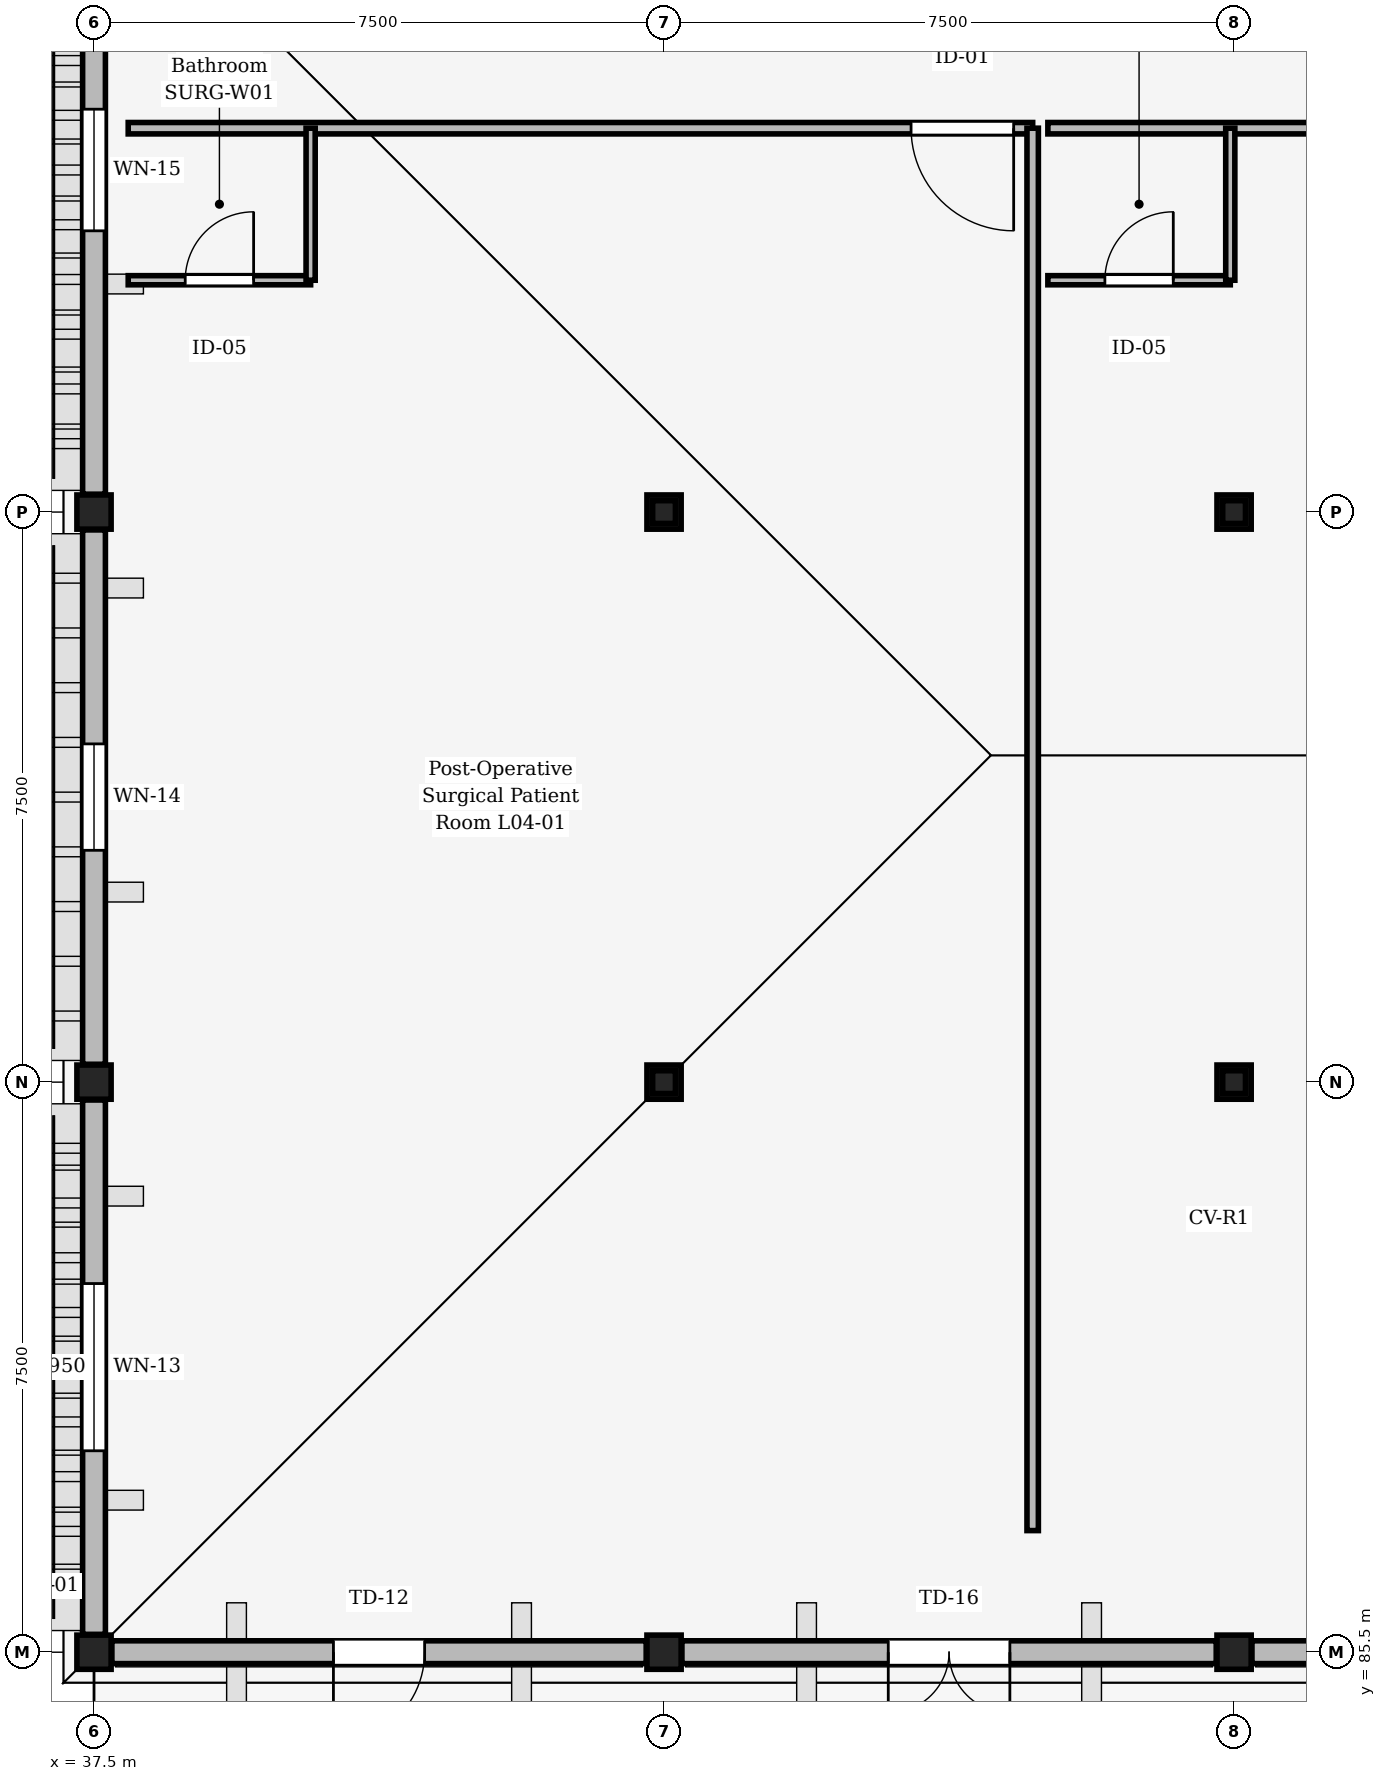
"""IFC4 building model, lengths in metres.
Left out: names, types, materials, properties, quantities, classifications, styles, units other than length and angle.
Written with IfcOpenShell. Run it as: python <this file> out.ifc"""

import sys

from ifc_helpers import new_model, si_unit, direction, frame, frame_2d, origin, origin_2d, place, context, subcontext, project, spatial, rectangle, i_section, extrude, element, fill, save


model = new_model("IFC4")
c1 = context("Model", 3, precision=1e-05, world=origin(), true_north=direction((0.0, 1.0)))
c2 = subcontext(c1, "Body", "Model", "MODEL_VIEW")
j1 = project(units=[si_unit("LENGTHUNIT", "METRE"), si_unit("PLANEANGLEUNIT", "RADIAN")], contexts=[c1])
p1 = place(None, origin())
s1 = spatial("IfcSite", under=j1, at=p1, CompositionType="ELEMENT")
p2 = place(p1, origin())
s2 = spatial("IfcBuilding", under=s1, at=p2, CompositionType="ELEMENT")
p3 = place(p2, frame((0.0, 0.0, 17.85)))
s3 = spatial("IfcBuildingStorey", under=s2, at=p3, CompositionType="ELEMENT", Elevation=17.85)
for number, where, z_axis, x_axis in (
    (1, (37.5, 85.5, 0.0), (0.0, 0.0, 1.0), (1.0, 0.0, 0.0)),
    (2, (37.5, 93.0, 0.0), (0.0, 0.0, 1.0), (1.0, 0.0, 0.0)),
    (3, (37.5, 100.5, 0.0), (0.0, 0.0, 1.0), (1.0, 0.0, 0.0)),
    (4, (45.0, 85.5, 0.0), (0.0, 0.0, 1.0), (1.0, 0.0, 0.0)),
    (5, (45.0, 93.0, 0.0), (0.0, 0.0, 1.0), (1.0, 0.0, 0.0)),
    (6, (45.0, 100.5, 0.0), (0.0, 0.0, 1.0), (1.0, 0.0, 0.0)),
    (7, (52.5, 85.5, 0.0), (0.0, 0.0, 1.0), (1.0, 0.0, 0.0)),
    (8, (52.5, 93.0, 0.0), (0.0, 0.0, 1.0), (1.0, 0.0, 0.0)),
    (9, (52.5, 100.5, 0.0), (0.0, 0.0, 1.0), (1.0, 0.0, 0.0)),
):
    element("IfcColumn", number, at=place(p3, frame(where, z_axis=z_axis, x_axis=x_axis)), inside=s3, PredefinedType="COLUMN", context=c2, shape_type="SweptSolid", body=[
        extrude(rectangle(XDim=0.45, YDim=0.45, at=origin_2d()), origin(), (0.0, 0.0, 1.0), 4.05),
    ])
for number, where, z_axis, x_axis in (
    (10, (45.0, 93.0, 4.05), (0.0, 0.0, 1.0), (1.0, 0.0, 0.0)),
    (11, (45.0, 100.5, 4.05), (0.0, 0.0, 1.0), (1.0, 0.0, 0.0)),
    (12, (52.5, 93.0, 4.05), (0.0, 0.0, 1.0), (1.0, 0.0, 0.0)),
):
    element("IfcColumn", number, at=place(p3, frame(where, z_axis=z_axis, x_axis=x_axis)), inside=s3, PredefinedType="COLUMN", context=c2, shape_type="SweptSolid", body=[
        extrude(i_section(OverallWidth=0.3, OverallDepth=0.3, WebThickness=0.011, FlangeThickness=0.019, FilletRadius=0.027, at=origin_2d()), origin(), (0.0, 0.0, 1.0), 1.97),
    ])
p4 = place(p3, frame((52.5, 100.5, 4.05), z_axis=(0.0, 0.0, 1.0), x_axis=(1.0, 0.0, 0.0)))
e13 = element("IfcColumn", 13, at=p4, inside=s3, PredefinedType="COLUMN", context=c2, shape_type="SweptSolid", body=[
    extrude(i_section(OverallWidth=0.3, OverallDepth=0.3, WebThickness=0.011, FlangeThickness=0.019, FilletRadius=0.027, at=origin_2d()), origin(), (0.0, 0.0, 1.0), 2.24),
])
p5 = place(p3, frame((44.765, 85.5, 0.0), z_axis=(0.0, 0.0, 1.0), x_axis=(-1.0, 0.0, 0.0)))
e14 = element("IfcWall", 14, at=p5, inside=s3, PredefinedType="STANDARD", context=c2, shape_type="SweptSolid", body=[
    extrude(rectangle(XDim=7.03, YDim=0.3, at=frame_2d((3.515, 0.0))), origin(), (0.0, 0.0, 1.0), 3.77),
])
p6 = place(p5, frame((2.915, 0.0, 0.0)))
e15 = element("IfcOpeningElement", 15, at=p6, cuts=e14, PredefinedType="OPENING", context=c2, shape_type="SweptSolid", body=[
    extrude(rectangle(XDim=1.2, YDim=2.3, at=frame_2d((0.6, 1.15))), frame((0.0, 0.16, 0.0), z_axis=(0.0, -1.0, 0.0), x_axis=(1.0, 0.0, 0.0)), (0.0, 0.0, 1.0), 0.32),
])
p7 = place(p3, frame((37.5, 85.735, 0.0), z_axis=(0.0, 0.0, 1.0), x_axis=(0.0, 1.0, 0.0)))
e16 = element("IfcWall", 16, at=p7, inside=s3, PredefinedType="STANDARD", context=c2, shape_type="SweptSolid", body=[
    extrude(rectangle(XDim=7.03, YDim=0.3, at=frame_2d((3.515, 0.0))), origin(), (0.0, 0.0, 1.0), 3.77),
])
p8 = place(p7, frame((2.415, 0.0, 0.9)))
e17 = element("IfcOpeningElement", 17, at=p8, cuts=e16, PredefinedType="OPENING", context=c2, shape_type="SweptSolid", body=[
    extrude(rectangle(XDim=2.2, YDim=1.95, at=frame_2d((1.1, 0.975))), frame((0.0, 0.16, 0.0), z_axis=(0.0, -1.0, 0.0), x_axis=(1.0, 0.0, 0.0)), (0.0, 0.0, 1.0), 0.32),
])
p9 = place(p3, frame((37.5, 93.235, 0.0), z_axis=(0.0, 0.0, 1.0), x_axis=(0.0, 1.0, 0.0)))
e18 = element("IfcWall", 18, at=p9, inside=s3, PredefinedType="STANDARD", context=c2, shape_type="SweptSolid", body=[
    extrude(rectangle(XDim=7.03, YDim=0.3, at=frame_2d((3.515, 0.0))), origin(), (0.0, 0.0, 1.0), 3.77),
])
p10 = place(p9, frame((2.815, 0.0, 0.9)))
e19 = element("IfcOpeningElement", 19, at=p10, cuts=e18, PredefinedType="OPENING", context=c2, shape_type="SweptSolid", body=[
    extrude(rectangle(XDim=1.4, YDim=1.8, at=frame_2d((0.7, 0.9))), frame((0.0, 0.16, 0.0), z_axis=(0.0, -1.0, 0.0), x_axis=(1.0, 0.0, 0.0)), (0.0, 0.0, 1.0), 0.32),
])
p11 = place(p3, frame((37.5, 100.735, 0.0), z_axis=(0.0, 0.0, 1.0), x_axis=(0.0, 1.0, 0.0)))
e20 = element("IfcWall", 20, at=p11, inside=s3, PredefinedType="STANDARD", context=c2, shape_type="SweptSolid", body=[
    extrude(rectangle(XDim=8.53, YDim=0.3, at=frame_2d((4.265, 0.0))), origin(), (0.0, 0.0, 1.0), 3.77),
])
p12 = place(p11, frame((3.465, 0.0, 0.9)))
e21 = element("IfcOpeningElement", 21, at=p12, cuts=e20, PredefinedType="OPENING", context=c2, shape_type="SweptSolid", body=[
    extrude(rectangle(XDim=1.6, YDim=1.8, at=frame_2d((0.8, 0.9))), frame((0.0, 0.16, 0.0), z_axis=(0.0, -1.0, 0.0), x_axis=(1.0, 0.0, 0.0)), (0.0, 0.0, 1.0), 0.32),
])
p13 = place(p3, frame((52.265, 85.5, 0.0), z_axis=(0.0, 0.0, 1.0), x_axis=(-1.0, 0.0, 0.0)))
e22 = element("IfcWall", 22, at=p13, inside=s3, PredefinedType="STANDARD", context=c2, shape_type="SweptSolid", body=[
    extrude(rectangle(XDim=7.03, YDim=0.3, at=frame_2d((3.515, 0.0))), origin(), (0.0, 0.0, 1.0), 3.77),
])
p14 = place(p13, frame((2.715, 0.0, 0.0)))
e23 = element("IfcOpeningElement", 23, at=p14, cuts=e22, PredefinedType="OPENING", context=c2, shape_type="SweptSolid", body=[
    extrude(rectangle(XDim=1.6, YDim=2.35, at=frame_2d((0.8, 1.175))), frame((0.0, 0.16, 0.0), z_axis=(0.0, -1.0, 0.0), x_axis=(1.0, 0.0, 0.0)), (0.0, 0.0, 1.0), 0.32),
])
p15 = place(p3, frame((59.765, 85.5, 0.0), z_axis=(0.0, 0.0, 1.0), x_axis=(-1.0, 0.0, 0.0)))
e24 = element("IfcWall", 24, at=p15, inside=s3, PredefinedType="STANDARD", context=c2, shape_type="SweptSolid", body=[
    extrude(rectangle(XDim=7.03, YDim=0.3, at=frame_2d((3.515, 0.0))), origin(), (0.0, 0.0, 1.0), 3.77),
])
p16 = place(p15, frame((2.915, 0.0, 0.0)))
e25 = element("IfcOpeningElement", 25, at=p16, cuts=e24, PredefinedType="OPENING", context=c2, shape_type="SweptSolid", body=[
    extrude(rectangle(XDim=1.2, YDim=2.3, at=frame_2d((0.6, 1.15))), frame((0.0, 0.16, 0.0), z_axis=(0.0, -1.0, 0.0), x_axis=(1.0, 0.0, 0.0)), (0.0, 0.0, 1.0), 0.32),
])
p17 = place(p3, frame((49.85, 105.55, 0.0), z_axis=(0.0, 0.0, 1.0), x_axis=(-1.0, 0.0, 0.0)))
e26 = element("IfcWall", 26, at=p17, inside=s3, PredefinedType="PARTITIONING", context=c2, shape_type="SweptSolid", body=[
    extrude(rectangle(XDim=11.9, YDim=0.15, at=frame_2d((5.95, 0.0))), origin(), (0.0, 0.0, 1.0), 3.755),
])
p18 = place(p17, frame((0.25, 0.0, 0.0)))
e27 = element("IfcOpeningElement", 27, at=p18, cuts=e26, PredefinedType="OPENING", context=c2, shape_type="SweptSolid", body=[
    extrude(rectangle(XDim=1.35, YDim=2.25, at=frame_2d((0.675, 1.125))), frame((0.0, 0.085, 0.0), z_axis=(0.0, -1.0, 0.0), x_axis=(1.0, 0.0, 0.0)), (0.0, 0.0, 1.0), 0.17),
])
p19 = place(p3, frame((37.95, 103.55, 0.0), z_axis=(0.0, 0.0, 1.0), x_axis=(1.0, 0.0, 0.0)))
e28 = element("IfcWall", 28, at=p19, inside=s3, PredefinedType="PARTITIONING", context=c2, shape_type="SweptSolid", body=[
    extrude(rectangle(XDim=2.4, YDim=0.12, at=frame_2d((1.2, 0.0))), origin(), (0.0, 0.0, 1.0), 3.755),
])
p20 = place(p19, frame((0.75, 0.0, 0.0)))
e29 = element("IfcOpeningElement", 29, at=p20, cuts=e28, PredefinedType="OPENING", context=c2, shape_type="SweptSolid", body=[
    extrude(rectangle(XDim=0.9, YDim=2.1, at=frame_2d((0.45, 1.05))), frame((0.0, 0.07, 0.0), z_axis=(0.0, -1.0, 0.0), x_axis=(1.0, 0.0, 0.0)), (0.0, 0.0, 1.0), 0.14),
])
p21 = place(p3, frame((40.35, 103.55, 0.0), z_axis=(0.0, 0.0, 1.0), x_axis=(0.0, 1.0, 0.0)))
e30 = element("IfcWall", 30, at=p21, inside=s3, PredefinedType="PARTITIONING", context=c2, shape_type="SweptSolid", body=[
    extrude(rectangle(XDim=2.0, YDim=0.12, at=frame_2d((1.0, 0.0))), origin(), (0.0, 0.0, 1.0), 3.755),
])
p22 = place(p3, frame((61.95, 105.55, 0.0), z_axis=(0.0, 0.0, 1.0), x_axis=(-1.0, 0.0, 0.0)))
e31 = element("IfcWall", 31, at=p22, inside=s3, PredefinedType="PARTITIONING", context=c2, shape_type="SweptSolid", body=[
    extrude(rectangle(XDim=11.9, YDim=0.15, at=frame_2d((5.95, 0.0))), origin(), (0.0, 0.0, 1.0), 3.755),
])
p23 = place(p22, frame((5.275, 0.0, 0.0)))
e32 = element("IfcOpeningElement", 32, at=p23, cuts=e31, PredefinedType="OPENING", context=c2, shape_type="SweptSolid", body=[
    extrude(rectangle(XDim=1.35, YDim=2.25, at=frame_2d((0.675, 1.125))), frame((0.0, 0.085, 0.0), z_axis=(0.0, -1.0, 0.0), x_axis=(1.0, 0.0, 0.0)), (0.0, 0.0, 1.0), 0.17),
])
p24 = place(p3, frame((50.05, 103.55, 0.0), z_axis=(0.0, 0.0, 1.0), x_axis=(1.0, 0.0, 0.0)))
e33 = element("IfcWall", 33, at=p24, inside=s3, PredefinedType="PARTITIONING", context=c2, shape_type="SweptSolid", body=[
    extrude(rectangle(XDim=2.4, YDim=0.12, at=frame_2d((1.2, 0.0))), origin(), (0.0, 0.0, 1.0), 3.755),
])
p25 = place(p24, frame((0.75, 0.0, 0.0)))
e34 = element("IfcOpeningElement", 34, at=p25, cuts=e33, PredefinedType="OPENING", context=c2, shape_type="SweptSolid", body=[
    extrude(rectangle(XDim=0.9, YDim=2.1, at=frame_2d((0.45, 1.05))), frame((0.0, 0.07, 0.0), z_axis=(0.0, -1.0, 0.0), x_axis=(1.0, 0.0, 0.0)), (0.0, 0.0, 1.0), 0.14),
])
p26 = place(p3, frame((52.45, 103.55, 0.0), z_axis=(0.0, 0.0, 1.0), x_axis=(0.0, 1.0, 0.0)))
e35 = element("IfcWall", 35, at=p26, inside=s3, PredefinedType="PARTITIONING", context=c2, shape_type="SweptSolid", body=[
    extrude(rectangle(XDim=2.0, YDim=0.12, at=frame_2d((1.0, 0.0))), origin(), (0.0, 0.0, 1.0), 3.755),
])
p27 = place(p3, frame((49.85, 87.1, 0.0), z_axis=(0.0, 0.0, 1.0), x_axis=(0.0, 1.0, 0.0)))
e36 = element("IfcWall", 36, at=p27, inside=s3, PredefinedType="PARTITIONING", context=c2, shape_type="SweptSolid", body=[
    extrude(rectangle(XDim=18.45, YDim=0.15, at=frame_2d((9.225, 0.0))), origin(), (0.0, 0.0, 1.0), 3.755),
])
p28 = place(p6, origin())
e37 = element("IfcDoor", 37, at=p28, inside=s3, OperationType="SINGLE_SWING_RIGHT", PredefinedType="DOOR", context=c2, shape_type="SweptSolid", body=[
    extrude(rectangle(XDim=1.2, YDim=2.3, at=frame_2d((0.6, 1.15))), frame((0.0, 0.025, 0.0), z_axis=(0.0, -1.0, 0.0), x_axis=(1.0, 0.0, 0.0)), (0.0, 0.0, 1.0), 0.05),
])
fill(e15, e37)
p29 = place(p8, origin())
e38 = element("IfcWindow", 38, at=p29, inside=s3, PartitioningType="SINGLE_PANEL", PredefinedType="WINDOW", context=c2, shape_type="SweptSolid", body=[
    extrude(rectangle(XDim=2.2, YDim=1.95, at=frame_2d((1.1, 0.975))), frame((0.0, 0.03, 0.0), z_axis=(0.0, -1.0, 0.0), x_axis=(1.0, 0.0, 0.0)), (0.0, 0.0, 1.0), 0.06),
])
fill(e17, e38)
p30 = place(p10, origin())
e39 = element("IfcWindow", 39, at=p30, inside=s3, PartitioningType="SINGLE_PANEL", PredefinedType="WINDOW", context=c2, shape_type="SweptSolid", body=[
    extrude(rectangle(XDim=1.4, YDim=1.8, at=frame_2d((0.7, 0.9))), frame((0.0, 0.03, 0.0), z_axis=(0.0, -1.0, 0.0), x_axis=(1.0, 0.0, 0.0)), (0.0, 0.0, 1.0), 0.06),
])
fill(e19, e39)
p31 = place(p12, origin())
e40 = element("IfcWindow", 40, at=p31, inside=s3, PartitioningType="SINGLE_PANEL", PredefinedType="WINDOW", context=c2, shape_type="SweptSolid", body=[
    extrude(rectangle(XDim=1.6, YDim=1.8, at=frame_2d((0.8, 0.9))), frame((0.0, 0.03, 0.0), z_axis=(0.0, -1.0, 0.0), x_axis=(1.0, 0.0, 0.0)), (0.0, 0.0, 1.0), 0.06),
])
fill(e21, e40)
p32 = place(p14, origin())
e41 = element("IfcDoor", 41, at=p32, inside=s3, OperationType="DOUBLE_DOOR_SINGLE_SWING", PredefinedType="DOOR", context=c2, shape_type="SweptSolid", body=[
    extrude(rectangle(XDim=1.6, YDim=2.35, at=frame_2d((0.8, 1.175))), frame((0.0, 0.025, 0.0), z_axis=(0.0, -1.0, 0.0), x_axis=(1.0, 0.0, 0.0)), (0.0, 0.0, 1.0), 0.05),
])
fill(e23, e41)
p33 = place(p18, origin())
e42 = element("IfcDoor", 42, at=p33, inside=s3, OperationType="SINGLE_SWING_LEFT", PredefinedType="DOOR", context=c2, shape_type="SweptSolid", body=[
    extrude(rectangle(XDim=1.35, YDim=2.25, at=frame_2d((0.675, 1.125))), frame((0.0, 0.025, 0.0), z_axis=(0.0, -1.0, 0.0), x_axis=(1.0, 0.0, 0.0)), (0.0, 0.0, 1.0), 0.05),
])
fill(e27, e42)
p34 = place(p20, origin())
e43 = element("IfcDoor", 43, at=p34, inside=s3, OperationType="SINGLE_SWING_RIGHT", PredefinedType="DOOR", context=c2, shape_type="SweptSolid", body=[
    extrude(rectangle(XDim=0.9, YDim=2.1, at=frame_2d((0.45, 1.05))), frame((0.0, 0.025, 0.0), z_axis=(0.0, -1.0, 0.0), x_axis=(1.0, 0.0, 0.0)), (0.0, 0.0, 1.0), 0.05),
])
fill(e29, e43)
p35 = place(p25, origin())
e44 = element("IfcDoor", 44, at=p35, inside=s3, OperationType="SINGLE_SWING_RIGHT", PredefinedType="DOOR", context=c2, shape_type="SweptSolid", body=[
    extrude(rectangle(XDim=0.9, YDim=2.1, at=frame_2d((0.45, 1.05))), frame((0.0, 0.025, 0.0), z_axis=(0.0, -1.0, 0.0), x_axis=(1.0, 0.0, 0.0)), (0.0, 0.0, 1.0), 0.05),
])
fill(e34, e44)
save(model, sys.argv[1])
